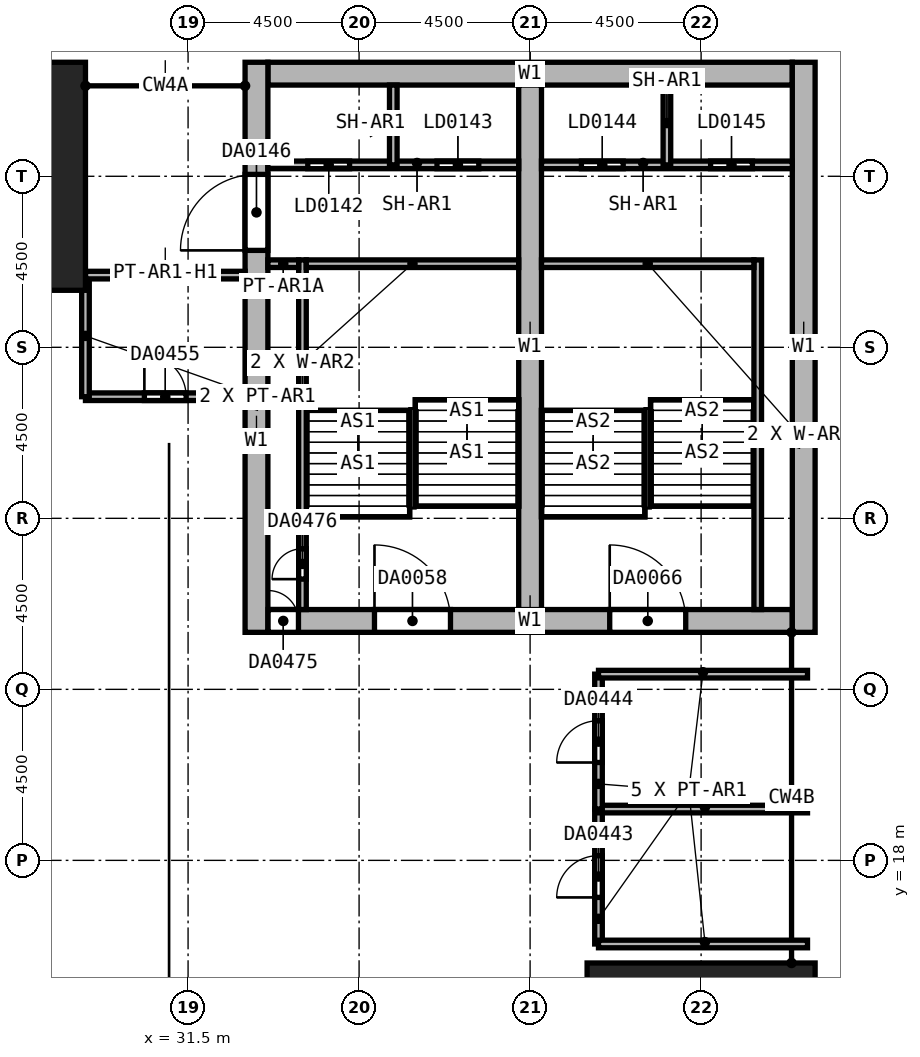
"""IFC4 building model, lengths in metres.
Left out: names, types, materials, properties, quantities, classifications, styles, units other than length and angle.
Written with IfcOpenShell. Run it as: python <this file> out.ifc"""

import sys

from ifc_helpers import new_model, si_unit, direction, frame, frame_2d, origin, origin_2d, place, context, subcontext, project, spatial, rectangle, extrude, element, fill, save


model = new_model("IFC4")
c1 = context("Model", 3, precision=1e-05, world=origin(), true_north=direction((0.0, 1.0)))
c2 = subcontext(c1, "Body", "Model", "MODEL_VIEW")
j1 = project(units=[si_unit("LENGTHUNIT", "METRE"), si_unit("PLANEANGLEUNIT", "RADIAN")], contexts=[c1])
p1 = place(None, origin())
s1 = spatial("IfcSite", under=j1, at=p1, CompositionType="ELEMENT")
p2 = place(p1, origin())
s2 = spatial("IfcBuilding", under=s1, at=p2, CompositionType="ELEMENT")
p3 = place(p2, frame((0.0, 0.0, 37.0)))
s3 = spatial("IfcBuildingStorey", under=s2, at=p3, CompositionType="ELEMENT", Elevation=37.0)
for number, where, z_axis, x_axis in (
    (1, (27.0, 36.0, 0.0), (0.0, 0.0, 1.0), (1.0, 0.0, 0.0)),
    (2, (45.0, 13.5, 0.0), (0.0, 0.0, 1.0), (0.0, 1.0, 0.0)),
):
    element("IfcColumn", number, at=place(p3, frame(where, z_axis=z_axis, x_axis=x_axis)), inside=s3, PredefinedType="COLUMN", context=c2, shape_type="SweptSolid", body=[
        extrude(rectangle(XDim=3.6, YDim=6.0, at=origin_2d()), origin(), (0.0, 0.0, 1.0), 5.8),
    ])
p4 = place(p3, frame((33.6, 38.7, 0.0), z_axis=(0.0, 0.0, 1.0), x_axis=(1.0, 0.0, 0.0)))
e3 = element("IfcWall", 3, at=p4, inside=s3, PredefinedType="SHEAR", context=c2, shape_type="SweptSolid", body=[
    extrude(rectangle(XDim=13.8, YDim=0.6, at=frame_2d((6.9, 0.0))), origin(), (0.0, 0.0, 1.0), 7.0),
])
p5 = place(p3, frame((33.6, 24.3, 0.0), z_axis=(0.0, 0.0, 1.0), x_axis=(1.0, 0.0, 0.0)))
e4 = element("IfcWall", 4, at=p5, inside=s3, PredefinedType="SHEAR", context=c2, shape_type="SweptSolid", body=[
    extrude(rectangle(XDim=13.8, YDim=0.6, at=frame_2d((6.9, 0.0))), origin(), (0.0, 0.0, 1.0), 7.0),
])
p6 = place(p5, frame((2.805, 0.0, 0.0)))
e5 = element("IfcOpeningElement", 5, at=p6, cuts=e4, PredefinedType="OPENING", context=c2, shape_type="SweptSolid", body=[
    extrude(rectangle(XDim=2.0, YDim=2.4, at=frame_2d((1.0, 1.2))), frame((0.0, 0.3, 0.0), z_axis=(0.0, -1.0, 0.0), x_axis=(1.0, 0.0, 0.0)), (0.0, 0.0, 1.0), 0.6),
])
p7 = place(p5, frame((8.995, 0.0, 0.0)))
e6 = element("IfcOpeningElement", 6, at=p7, cuts=e4, PredefinedType="OPENING", context=c2, shape_type="SweptSolid", body=[
    extrude(rectangle(XDim=2.0, YDim=2.4, at=frame_2d((1.0, 1.2))), frame((0.0, 0.3, 0.0), z_axis=(0.0, -1.0, 0.0), x_axis=(1.0, 0.0, 0.0)), (0.0, 0.0, 1.0), 0.6),
])
p8 = place(p5, frame((0.005, 0.0, 0.0)))
e7 = element("IfcOpeningElement", 7, at=p8, cuts=e4, PredefinedType="OPENING", context=c2, shape_type="SweptSolid", body=[
    extrude(rectangle(XDim=0.8, YDim=2.1, at=frame_2d((0.4, 1.05))), frame((0.0, 0.3, 0.0), z_axis=(0.0, -1.0, 0.0), x_axis=(1.0, 0.0, 0.0)), (0.0, 0.0, 1.0), 0.6),
])
p9 = place(p3, frame((33.3, 24.0, 0.0), z_axis=(0.0, 0.0, 1.0), x_axis=(0.0, 1.0, 0.0)))
e8 = element("IfcWall", 8, at=p9, inside=s3, PredefinedType="SHEAR", context=c2, shape_type="SweptSolid", body=[
    extrude(rectangle(XDim=15.0, YDim=0.6, at=frame_2d((7.5, 0.0))), origin(), (0.0, 0.0, 1.0), 7.0),
])
p10 = place(p9, frame((10.05, 0.0, 0.0)))
e9 = element("IfcOpeningElement", 9, at=p10, cuts=e8, PredefinedType="OPENING", context=c2, shape_type="SweptSolid", body=[
    extrude(rectangle(XDim=2.0, YDim=2.4, at=frame_2d((1.0, 1.2))), frame((0.0, 0.3, 0.0), z_axis=(0.0, -1.0, 0.0), x_axis=(1.0, 0.0, 0.0)), (0.0, 0.0, 1.0), 0.6),
])
p11 = place(p3, frame((47.7, 24.0, 0.0), z_axis=(0.0, 0.0, 1.0), x_axis=(0.0, 1.0, 0.0)))
e10 = element("IfcWall", 10, at=p11, inside=s3, PredefinedType="SHEAR", context=c2, shape_type="SweptSolid", body=[
    extrude(rectangle(XDim=15.0, YDim=0.6, at=frame_2d((7.5, 0.0))), origin(), (0.0, 0.0, 1.0), 7.0),
])
p12 = place(p3, frame((40.5, 24.6, 0.0), z_axis=(0.0, 0.0, 1.0), x_axis=(0.0, 1.0, 0.0)))
e11 = element("IfcWall", 11, at=p12, inside=s3, PredefinedType="SHEAR", context=c2, shape_type="SweptSolid", body=[
    extrude(rectangle(XDim=13.8, YDim=0.6, at=frame_2d((6.9, 0.0))), origin(), (0.0, 0.0, 1.0), 7.0),
])
p13 = place(p3, frame((34.51, 24.6, 0.0), z_axis=(0.0, 0.0, 1.0), x_axis=(0.0, 1.0, 0.0)))
e12 = element("IfcWall", 12, at=p13, inside=s3, PredefinedType="SOLIDWALL", context=c2, shape_type="SweptSolid", body=[
    extrude(rectangle(XDim=9.2, YDim=0.2, at=frame_2d((4.6, 0.0))), origin(), (0.0, 0.0, 1.0), 7.0),
])
p14 = place(p13, frame((0.8, 0.0, 0.0)))
e13 = element("IfcOpeningElement", 13, at=p14, cuts=e12, PredefinedType="OPENING", context=c2, shape_type="SweptSolid", body=[
    extrude(rectangle(XDim=0.8, YDim=2.1, at=frame_2d((0.4, 1.05))), frame((0.0, 0.1, 0.0), z_axis=(0.0, -1.0, 0.0), x_axis=(1.0, 0.0, 0.0)), (0.0, 0.0, 1.0), 0.2),
])
p15 = place(p3, frame((34.61, 33.7, 0.0), z_axis=(0.0, 0.0, 1.0), x_axis=(1.0, 0.0, 0.0)))
e14 = element("IfcWall", 14, at=p15, inside=s3, PredefinedType="SOLIDWALL", context=c2, shape_type="SweptSolid", body=[
    extrude(rectangle(XDim=5.59, YDim=0.2, at=frame_2d((2.795, 0.0))), origin(), (0.0, 0.0, 1.0), 7.0),
])
p16 = place(p3, frame((46.49, 24.6, 0.0), z_axis=(0.0, 0.0, 1.0), x_axis=(0.0, 1.0, 0.0)))
e15 = element("IfcWall", 15, at=p16, inside=s3, PredefinedType="SOLIDWALL", context=c2, shape_type="SweptSolid", body=[
    extrude(rectangle(XDim=9.2, YDim=0.2, at=frame_2d((4.6, 0.0))), origin(), (0.0, 0.0, 1.0), 7.0),
])
p17 = place(p3, frame((40.8, 33.7, 0.0), z_axis=(0.0, 0.0, 1.0), x_axis=(1.0, 0.0, 0.0)))
e16 = element("IfcWall", 16, at=p17, inside=s3, PredefinedType="SOLIDWALL", context=c2, shape_type="SweptSolid", body=[
    extrude(rectangle(XDim=5.59, YDim=0.2, at=frame_2d((2.795, 0.0))), origin(), (0.0, 0.0, 1.0), 7.0),
])
p18 = place(p3, frame((33.6, 36.3, 0.0), z_axis=(0.0, 0.0, 1.0), x_axis=(1.0, 0.0, 0.0)))
e17 = element("IfcWall", 17, at=p18, inside=s3, PredefinedType="SHEAR", context=c2, shape_type="SweptSolid", body=[
    extrude(rectangle(XDim=6.6, YDim=0.2, at=frame_2d((3.3, 0.0))), origin(), (0.0, 0.0, 1.0), 7.0),
])
p19 = place(p18, frame((1.05, 0.0, 0.0)))
e18 = element("IfcOpeningElement", 18, at=p19, cuts=e17, PredefinedType="OPENING", context=c2, shape_type="SweptSolid", body=[
    extrude(rectangle(XDim=1.1, YDim=2.4, at=frame_2d((0.55, 1.2))), frame((0.0, 0.1, 0.0), z_axis=(0.0, -1.0, 0.0), x_axis=(1.0, 0.0, 0.0)), (0.0, 0.0, 1.0), 0.2),
])
p20 = place(p18, frame((4.45, 0.0, 0.0)))
e19 = element("IfcOpeningElement", 19, at=p20, cuts=e17, PredefinedType="OPENING", context=c2, shape_type="SweptSolid", body=[
    extrude(rectangle(XDim=1.1, YDim=2.4, at=frame_2d((0.55, 1.2))), frame((0.0, 0.1, 0.0), z_axis=(0.0, -1.0, 0.0), x_axis=(1.0, 0.0, 0.0)), (0.0, 0.0, 1.0), 0.2),
])
p21 = place(p3, frame((40.8, 36.3, 0.0), z_axis=(0.0, 0.0, 1.0), x_axis=(1.0, 0.0, 0.0)))
e20 = element("IfcWall", 20, at=p21, inside=s3, PredefinedType="SHEAR", context=c2, shape_type="SweptSolid", body=[
    extrude(rectangle(XDim=6.6, YDim=0.2, at=frame_2d((3.3, 0.0))), origin(), (0.0, 0.0, 1.0), 7.0),
])
p22 = place(p21, frame((1.05, 0.0, 0.0)))
e21 = element("IfcOpeningElement", 21, at=p22, cuts=e20, PredefinedType="OPENING", context=c2, shape_type="SweptSolid", body=[
    extrude(rectangle(XDim=1.1, YDim=2.4, at=frame_2d((0.55, 1.2))), frame((0.0, 0.1, 0.0), z_axis=(0.0, -1.0, 0.0), x_axis=(1.0, 0.0, 0.0)), (0.0, 0.0, 1.0), 0.2),
])
p23 = place(p21, frame((4.45, 0.0, 0.0)))
e22 = element("IfcOpeningElement", 22, at=p23, cuts=e20, PredefinedType="OPENING", context=c2, shape_type="SweptSolid", body=[
    extrude(rectangle(XDim=1.1, YDim=2.4, at=frame_2d((0.55, 1.2))), frame((0.0, 0.1, 0.0), z_axis=(0.0, -1.0, 0.0), x_axis=(1.0, 0.0, 0.0)), (0.0, 0.0, 1.0), 0.2),
])
for number, where, z_axis, x_axis in (
    (23, (36.9, 36.3, 0.0), (0.0, 0.0, 1.0), (0.0, 1.0, 0.0)),
    (24, (44.1, 36.3, 0.0), (0.0, 0.0, 1.0), (0.0, 1.0, 0.0)),
):
    element("IfcWall", number, at=place(p3, frame(where, z_axis=z_axis, x_axis=x_axis)), inside=s3, PredefinedType="SHEAR", context=c2, shape_type="SweptSolid", body=[
        extrude(rectangle(XDim=2.1, YDim=0.2, at=frame_2d((1.05, 0.0))), origin(), (0.0, 0.0, 1.0), 7.0),
    ])
p24 = place(p3, frame((42.3, 15.8, 0.0), z_axis=(0.0, 0.0, 1.0), x_axis=(0.0, 1.0, 0.0)))
e25 = element("IfcWall", 25, at=p24, inside=s3, PredefinedType="PARTITIONING", context=c2, shape_type="SweptSolid", body=[
    extrude(rectangle(XDim=3.55, YDim=0.2, at=frame_2d((1.775, 0.0))), origin(), (0.0, 0.0, 1.0), 6.7),
])
p25 = place(p24, frame((1.225, 0.0, 0.0)))
e26 = element("IfcOpeningElement", 26, at=p25, cuts=e25, PredefinedType="OPENING", context=c2, shape_type="SweptSolid", body=[
    extrude(rectangle(XDim=1.1, YDim=2.4, at=frame_2d((0.55, 1.2))), frame((0.0, 0.1, 0.0), z_axis=(0.0, -1.0, 0.0), x_axis=(1.0, 0.0, 0.0)), (0.0, 0.0, 1.0), 0.2),
])
for number, where, z_axis, x_axis in (
    (27, (42.3, 15.8, 0.0), (0.0, 0.0, 1.0), (1.0, 0.0, 0.0)),
    (28, (42.3, 19.35, 0.0), (0.0, 0.0, 1.0), (1.0, 0.0, 0.0)),
):
    element("IfcWall", number, at=place(p3, frame(where, z_axis=z_axis, x_axis=x_axis)), inside=s3, PredefinedType="PARTITIONING", context=c2, shape_type="SweptSolid", body=[
        extrude(rectangle(XDim=5.5, YDim=0.2, at=frame_2d((2.75, 0.0))), origin(), (0.0, 0.0, 1.0), 6.7),
    ])
p26 = place(p3, frame((42.3, 19.35, 0.0), z_axis=(0.0, 0.0, 1.0), x_axis=(0.0, 1.0, 0.0)))
e29 = element("IfcWall", 29, at=p26, inside=s3, PredefinedType="PARTITIONING", context=c2, shape_type="SweptSolid", body=[
    extrude(rectangle(XDim=3.55, YDim=0.2, at=frame_2d((1.775, 0.0))), origin(), (0.0, 0.0, 1.0), 6.7),
])
p27 = place(p26, frame((1.225, 0.0, 0.0)))
e30 = element("IfcOpeningElement", 30, at=p27, cuts=e29, PredefinedType="OPENING", context=c2, shape_type="SweptSolid", body=[
    extrude(rectangle(XDim=1.1, YDim=2.4, at=frame_2d((0.55, 1.2))), frame((0.0, 0.1, 0.0), z_axis=(0.0, -1.0, 0.0), x_axis=(1.0, 0.0, 0.0)), (0.0, 0.0, 1.0), 0.2),
])
p28 = place(p3, frame((42.3, 22.9, 0.0), z_axis=(0.0, 0.0, 1.0), x_axis=(1.0, 0.0, 0.0)))
e31 = element("IfcWall", 31, at=p28, inside=s3, PredefinedType="PARTITIONING", context=c2, shape_type="SweptSolid", body=[
    extrude(rectangle(XDim=5.5, YDim=0.2, at=frame_2d((2.75, 0.0))), origin(), (0.0, 0.0, 1.0), 6.7),
])
p29 = place(p3, frame((28.8, 30.2, 0.0), z_axis=(0.0, 0.0, 1.0), x_axis=(1.0, 0.0, 0.0)))
e32 = element("IfcWall", 32, at=p29, inside=s3, PredefinedType="PARTITIONING", context=c2, shape_type="SweptSolid", body=[
    extrude(rectangle(XDim=4.2, YDim=0.2, at=frame_2d((2.1, 0.0))), origin(), (0.0, 0.0, 1.0), 6.7),
])
p30 = place(p29, frame((1.55, 0.0, 0.0)))
e33 = element("IfcOpeningElement", 33, at=p30, cuts=e32, PredefinedType="OPENING", context=c2, shape_type="SweptSolid", body=[
    extrude(rectangle(XDim=1.1, YDim=2.4, at=frame_2d((0.55, 1.2))), frame((0.0, 0.1, 0.0), z_axis=(0.0, -1.0, 0.0), x_axis=(1.0, 0.0, 0.0)), (0.0, 0.0, 1.0), 0.2),
])
p31 = place(p3, frame((28.8, 30.2, 0.0), z_axis=(0.0, 0.0, 1.0), x_axis=(0.0, 1.0, 0.0)))
e34 = element("IfcWall", 34, at=p31, inside=s3, PredefinedType="PARTITIONING", context=c2, shape_type="SweptSolid", body=[
    extrude(rectangle(XDim=3.2, YDim=0.2, at=frame_2d((1.6, 0.0))), origin(), (0.0, 0.0, 1.0), 6.7),
])
p32 = place(p3, frame((28.8, 33.4, 0.0), z_axis=(0.0, 0.0, 1.0), x_axis=(1.0, 0.0, 0.0)))
e35 = element("IfcWall", 35, at=p32, inside=s3, PredefinedType="PARTITIONING", context=c2, shape_type="SweptSolid", body=[
    extrude(rectangle(XDim=4.2, YDim=0.2, at=frame_2d((2.1, 0.0))), origin(), (0.0, 0.0, 1.0), 6.089),
])
p33 = place(p3, frame((33.6, 33.7, 0.0), z_axis=(0.0, 0.0, 1.0), x_axis=(1.0, 0.0, 0.0)))
e36 = element("IfcWall", 36, at=p33, inside=s3, PredefinedType="PARTITIONING", context=c2, shape_type="SweptSolid", body=[
    extrude(rectangle(XDim=0.81, YDim=0.2, at=frame_2d((0.405, 0.0))), origin(), (0.0, 0.0, 1.0), 7.0),
])
p34 = place(p6, origin())
e37 = element("IfcDoor", 37, at=p34, inside=s3, OperationType="DOUBLE_DOOR_SINGLE_SWING", PredefinedType="DOOR", context=c2, shape_type="SweptSolid", body=[
    extrude(rectangle(XDim=2.0, YDim=2.4, at=frame_2d((1.0, 1.2))), frame((0.0, 0.025, 0.0), z_axis=(0.0, -1.0, 0.0), x_axis=(1.0, 0.0, 0.0)), (0.0, 0.0, 1.0), 0.05),
])
fill(e5, e37)
p35 = place(p7, origin())
e38 = element("IfcDoor", 38, at=p35, inside=s3, OperationType="DOUBLE_DOOR_SINGLE_SWING", PredefinedType="DOOR", context=c2, shape_type="SweptSolid", body=[
    extrude(rectangle(XDim=2.0, YDim=2.4, at=frame_2d((1.0, 1.2))), frame((0.0, 0.025, 0.0), z_axis=(0.0, -1.0, 0.0), x_axis=(1.0, 0.0, 0.0)), (0.0, 0.0, 1.0), 0.05),
])
fill(e6, e38)
p36 = place(p19, origin())
e39 = element("IfcDoor", 39, at=p36, inside=s3, OperationType="DOUBLE_DOOR_SLIDING", PredefinedType="DOOR", context=c2, shape_type="SweptSolid", body=[
    extrude(rectangle(XDim=1.1, YDim=2.4, at=frame_2d((0.55, 1.2))), frame((0.0, 0.025, 0.0), z_axis=(0.0, -1.0, 0.0), x_axis=(1.0, 0.0, 0.0)), (0.0, 0.0, 1.0), 0.05),
])
fill(e18, e39)
p37 = place(p20, origin())
e40 = element("IfcDoor", 40, at=p37, inside=s3, OperationType="DOUBLE_DOOR_SLIDING", PredefinedType="DOOR", context=c2, shape_type="SweptSolid", body=[
    extrude(rectangle(XDim=1.1, YDim=2.4, at=frame_2d((0.55, 1.2))), frame((0.0, 0.025, 0.0), z_axis=(0.0, -1.0, 0.0), x_axis=(1.0, 0.0, 0.0)), (0.0, 0.0, 1.0), 0.05),
])
fill(e19, e40)
p38 = place(p22, origin())
e41 = element("IfcDoor", 41, at=p38, inside=s3, OperationType="DOUBLE_DOOR_SLIDING", PredefinedType="DOOR", context=c2, shape_type="SweptSolid", body=[
    extrude(rectangle(XDim=1.1, YDim=2.4, at=frame_2d((0.55, 1.2))), frame((0.0, 0.025, 0.0), z_axis=(0.0, -1.0, 0.0), x_axis=(1.0, 0.0, 0.0)), (0.0, 0.0, 1.0), 0.05),
])
fill(e21, e41)
p39 = place(p23, origin())
e42 = element("IfcDoor", 42, at=p39, inside=s3, OperationType="DOUBLE_DOOR_SLIDING", PredefinedType="DOOR", context=c2, shape_type="SweptSolid", body=[
    extrude(rectangle(XDim=1.1, YDim=2.4, at=frame_2d((0.55, 1.2))), frame((0.0, 0.025, 0.0), z_axis=(0.0, -1.0, 0.0), x_axis=(1.0, 0.0, 0.0)), (0.0, 0.0, 1.0), 0.05),
])
fill(e22, e42)
p40 = place(p10, origin())
e43 = element("IfcDoor", 43, at=p40, inside=s3, OperationType="DOUBLE_DOOR_SINGLE_SWING", PredefinedType="DOOR", context=c2, shape_type="SweptSolid", body=[
    extrude(rectangle(XDim=2.0, YDim=2.4, at=frame_2d((1.0, 1.2))), frame((0.0, 0.025, 0.0), z_axis=(0.0, -1.0, 0.0), x_axis=(1.0, 0.0, 0.0)), (0.0, 0.0, 1.0), 0.05),
])
fill(e9, e43)
p41 = place(p25, origin())
e44 = element("IfcDoor", 44, at=p41, inside=s3, OperationType="DOUBLE_DOOR_SINGLE_SWING", PredefinedType="DOOR", context=c2, shape_type="SweptSolid", body=[
    extrude(rectangle(XDim=1.1, YDim=2.4, at=frame_2d((0.55, 1.2))), frame((0.0, 0.025, 0.0), z_axis=(0.0, -1.0, 0.0), x_axis=(1.0, 0.0, 0.0)), (0.0, 0.0, 1.0), 0.05),
])
fill(e26, e44)
p42 = place(p27, origin())
e45 = element("IfcDoor", 45, at=p42, inside=s3, OperationType="DOUBLE_DOOR_SINGLE_SWING", PredefinedType="DOOR", context=c2, shape_type="SweptSolid", body=[
    extrude(rectangle(XDim=1.1, YDim=2.4, at=frame_2d((0.55, 1.2))), frame((0.0, 0.025, 0.0), z_axis=(0.0, -1.0, 0.0), x_axis=(1.0, 0.0, 0.0)), (0.0, 0.0, 1.0), 0.05),
])
fill(e30, e45)
p43 = place(p30, origin())
e46 = element("IfcDoor", 46, at=p43, inside=s3, OperationType="DOUBLE_DOOR_SINGLE_SWING", PredefinedType="DOOR", context=c2, shape_type="SweptSolid", body=[
    extrude(rectangle(XDim=1.1, YDim=2.4, at=frame_2d((0.55, 1.2))), frame((0.0, 0.025, 0.0), z_axis=(0.0, -1.0, 0.0), x_axis=(1.0, 0.0, 0.0)), (0.0, 0.0, 1.0), 0.05),
])
fill(e33, e46)
p44 = place(p8, origin())
e47 = element("IfcDoor", 47, at=p44, inside=s3, OperationType="SINGLE_SWING_LEFT", PredefinedType="DOOR", context=c2, shape_type="SweptSolid", body=[
    extrude(rectangle(XDim=0.8, YDim=2.1, at=frame_2d((0.4, 1.05))), frame((0.0, 0.025, 0.0), z_axis=(0.0, -1.0, 0.0), x_axis=(1.0, 0.0, 0.0)), (0.0, 0.0, 1.0), 0.05),
])
fill(e7, e47)
p45 = place(p14, origin())
e48 = element("IfcDoor", 48, at=p45, inside=s3, OperationType="SINGLE_SWING_LEFT", PredefinedType="DOOR", context=c2, shape_type="SweptSolid", body=[
    extrude(rectangle(XDim=0.8, YDim=2.1, at=frame_2d((0.4, 1.05))), frame((0.0, 0.025, 0.0), z_axis=(0.0, -1.0, 0.0), x_axis=(1.0, 0.0, 0.0)), (0.0, 0.0, 1.0), 0.05),
])
fill(e13, e48)
save(model, sys.argv[1])
